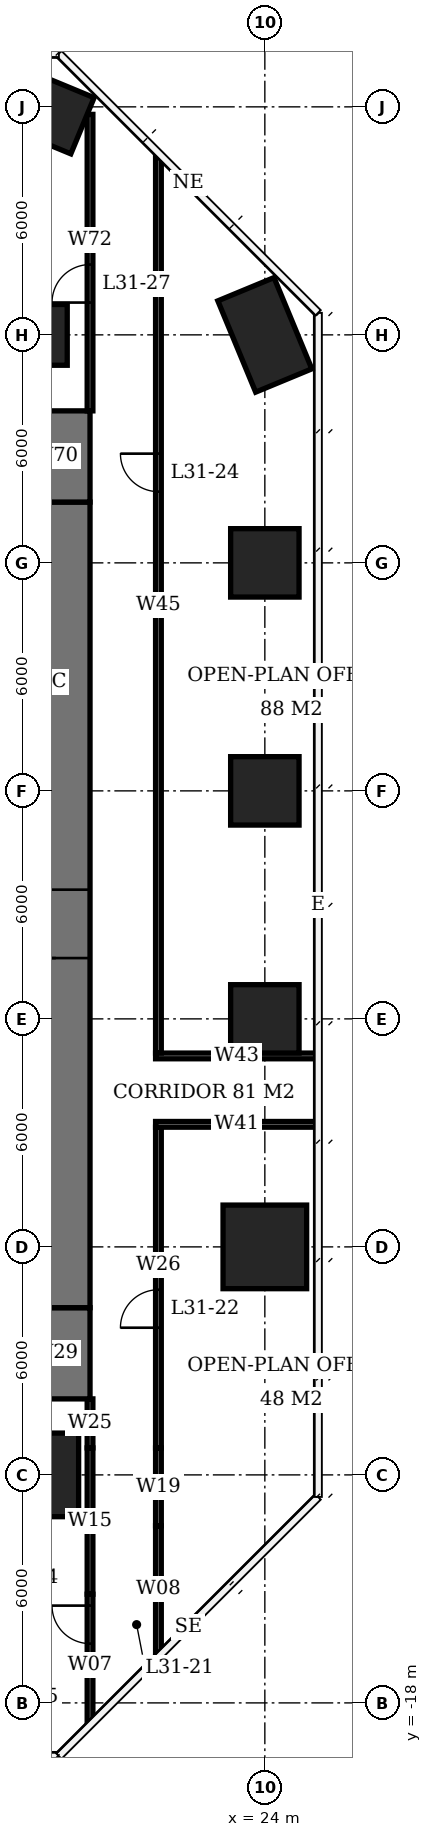
"""IFC4 building model, lengths in metres.
Left out: names, types, materials, properties, quantities, classifications, styles, units other than length and angle.
Written with IfcOpenShell. Run it as: python <this file> out.ifc"""

import sys

from ifc_helpers import new_model, si_unit, direction, frame, frame_2d, origin, origin_2d, place, context, subcontext, project, spatial, rectangle, extrude, element, fill, save


model = new_model("IFC4")
c1 = context("Model", 3, precision=1e-05, world=origin(), true_north=direction((0.0, 1.0)))
c2 = subcontext(c1, "Body", "Model", "MODEL_VIEW")
j1 = project(units=[si_unit("LENGTHUNIT", "METRE"), si_unit("PLANEANGLEUNIT", "RADIAN")], contexts=[c1])
p1 = place(None, origin())
s1 = spatial("IfcSite", under=j1, at=p1, CompositionType="ELEMENT")
p2 = place(p1, origin())
s2 = spatial("IfcBuilding", under=s1, at=p2, CompositionType="ELEMENT")
p3 = place(p2, frame((0.0, 0.0, 128.9)))
s3 = spatial("IfcBuildingStorey", under=s2, at=p3, CompositionType="ELEMENT", Elevation=128.9)
p4 = place(p3, frame((18.0, -12.0, 0.0), z_axis=(0.0, 0.0, 1.0), x_axis=(1.0, 0.0, 0.0)))
e1 = element("IfcColumn", 1, at=p4, inside=s3, PredefinedType="COLUMN", context=c2, shape_type="SweptSolid", body=[
    extrude(rectangle(XDim=2.2, YDim=2.2, at=origin_2d()), origin(), (0.0, 0.0, 1.0), 3.9),
])
p5 = place(p3, frame((18.0, 18.0, 0.0), z_axis=(0.0, 0.0, 1.0), x_axis=(1.0, 0.0, 0.0)))
e2 = element("IfcColumn", 2, at=p5, inside=s3, PredefinedType="COLUMN", context=c2, shape_type="SweptSolid", body=[
    extrude(rectangle(XDim=1.6, YDim=1.6, at=origin_2d()), origin(), (0.0, 0.0, 1.0), 3.9),
])
p6 = place(p3, frame((18.0, 24.0, 0.0), z_axis=(0.0, 0.0, 1.0), x_axis=(0.923879532511, -0.382683432365, 0.0)))
e3 = element("IfcColumn", 3, at=p6, inside=s3, PredefinedType="COLUMN", context=c2, shape_type="SweptSolid", body=[
    extrude(rectangle(XDim=2.6, YDim=1.6, at=origin_2d()), origin(), (0.0, 0.0, 1.0), 3.9),
])
p7 = place(p3, frame((24.0, -6.0, 0.0), z_axis=(0.0, 0.0, 1.0), x_axis=(1.0, 0.0, 0.0)))
e4 = element("IfcColumn", 4, at=p7, inside=s3, PredefinedType="COLUMN", context=c2, shape_type="SweptSolid", body=[
    extrude(rectangle(XDim=2.2, YDim=2.2, at=origin_2d()), origin(), (0.0, 0.0, 1.0), 3.9),
])
for number, where, z_axis, x_axis in (
    (5, (24.0, 0.0, 0.0), (0.0, 0.0, 1.0), (1.0, 0.0, 0.0)),
    (6, (24.0, 6.0, 0.0), (0.0, 0.0, 1.0), (1.0, 0.0, 0.0)),
    (7, (24.0, 12.0, 0.0), (0.0, 0.0, 1.0), (1.0, 0.0, 0.0)),
):
    element("IfcColumn", number, at=place(p3, frame(where, z_axis=z_axis, x_axis=x_axis)), inside=s3, PredefinedType="COLUMN", context=c2, shape_type="SweptSolid", body=[
        extrude(rectangle(XDim=1.8, YDim=1.8, at=origin_2d()), origin(), (0.0, 0.0, 1.0), 3.9),
    ])
p8 = place(p3, frame((24.0, 18.0, 0.0), z_axis=(0.0, 0.0, 1.0), x_axis=(0.382683432365, -0.923879532511, 0.0)))
e8 = element("IfcColumn", 8, at=p8, inside=s3, PredefinedType="COLUMN", context=c2, shape_type="SweptSolid", body=[
    extrude(rectangle(XDim=2.6, YDim=1.6, at=origin_2d()), origin(), (0.0, 0.0, 1.0), 3.9),
])
p9 = place(p3, frame((18.5, -7.6, 0.0), z_axis=(0.0, 0.0, 1.0), x_axis=(0.0, 1.0, 0.0)))
e9 = element("IfcWall", 9, at=p9, inside=s3, PredefinedType="SHEAR", context=c2, shape_type="SweptSolid", body=[
    extrude(rectangle(XDim=21.2, YDim=1.8, at=frame_2d((10.6, 0.0))), origin(), (0.0, 0.0, 1.0), 3.9),
])
p10 = place(p9, frame((9.2, 0.0, 0.0)))
e10 = element("IfcOpeningElement", 10, at=p10, cuts=e9, PredefinedType="OPENING", context=c2, shape_type="SweptSolid", body=[
    extrude(rectangle(XDim=1.8, YDim=2.4, at=frame_2d((0.9, 1.2))), frame((0.0, 0.91, 0.0), z_axis=(0.0, -1.0, 0.0), x_axis=(1.0, 0.0, 0.0)), (0.0, 0.0, 1.0), 1.82),
])
for number, where, z_axis, x_axis in (
    (11, (18.5, -10.0, 0.0), (0.0, 0.0, 1.0), (0.0, 1.0, 0.0)),
    (12, (18.5, 13.6, 0.0), (0.0, 0.0, 1.0), (0.0, 1.0, 0.0)),
):
    element("IfcWall", number, at=place(p3, frame(where, z_axis=z_axis, x_axis=x_axis)), inside=s3, PredefinedType="SHEAR", context=c2, shape_type="SweptSolid", body=[
        extrude(rectangle(XDim=2.4, YDim=1.8, at=frame_2d((1.2, 0.0))), origin(), (0.0, 0.0, 1.0), 3.9),
    ])
p11 = place(p3, frame((19.4, -18.489, 0.0), z_axis=(0.0, 0.0, 1.0), x_axis=(0.0, 1.0, 0.0)))
e13 = element("IfcWall", 13, at=p11, inside=s3, PredefinedType="PARTITIONING", context=c2, shape_type="SweptSolid", body=[
    extrude(rectangle(XDim=3.349, YDim=0.15, at=frame_2d((1.675, 0.0))), origin(), (0.0, 0.0, 1.0), 3.65),
])
p12 = place(p11, frame((2.049, 0.0, 0.0)))
e14 = element("IfcOpeningElement", 14, at=p12, cuts=e13, PredefinedType="OPENING", context=c2, shape_type="SweptSolid", body=[
    extrude(rectangle(XDim=1.0, YDim=2.1, at=frame_2d((0.5, 1.05))), frame((0.0, 0.085, 0.0), z_axis=(0.0, -1.0, 0.0), x_axis=(1.0, 0.0, 0.0)), (0.0, 0.0, 1.0), 0.17),
])
p13 = place(p3, frame((19.4, -15.14, 0.0), z_axis=(0.0, 0.0, 1.0), x_axis=(0.0, 1.0, 0.0)))
e15 = element("IfcWall", 15, at=p13, inside=s3, PredefinedType="PARTITIONING", context=c2, shape_type="SweptSolid", body=[
    extrude(rectangle(XDim=3.85, YDim=0.15, at=frame_2d((1.925, 0.0))), origin(), (0.0, 0.0, 1.0), 2.65),
])
p14 = place(p3, frame((19.4, -11.29, 0.0), z_axis=(0.0, 0.0, 1.0), x_axis=(0.0, 1.0, 0.0)))
e16 = element("IfcWall", 16, at=p14, inside=s3, PredefinedType="PARTITIONING", context=c2, shape_type="SweptSolid", body=[
    extrude(rectangle(XDim=1.29, YDim=0.15, at=frame_2d((0.645, 0.0))), origin(), (0.0, 0.0, 1.0), 3.65),
])
p15 = place(p3, frame((19.4, 16.0, 0.0), z_axis=(0.0, 0.0, 1.0), x_axis=(0.0, 1.0, 0.0)))
e17 = element("IfcWall", 17, at=p15, inside=s3, PredefinedType="PARTITIONING", context=c2, shape_type="SweptSolid", body=[
    extrude(rectangle(XDim=7.802, YDim=0.15, at=frame_2d((3.901, 0.0))), origin(), (0.0, 0.0, 1.0), 3.65),
])
p16 = place(p15, frame((2.85, 0.0, 0.0)))
e18 = element("IfcOpeningElement", 18, at=p16, cuts=e17, PredefinedType="OPENING", context=c2, shape_type="SweptSolid", body=[
    extrude(rectangle(XDim=1.0, YDim=2.1, at=frame_2d((0.5, 1.05))), frame((0.0, 0.085, 0.0), z_axis=(0.0, -1.0, 0.0), x_axis=(1.0, 0.0, 0.0)), (0.0, 0.0, 1.0), 0.17),
])
p17 = place(p3, frame((21.2, -16.689, 0.0), z_axis=(0.0, 0.0, 1.0), x_axis=(0.0, 1.0, 0.0)))
e19 = element("IfcWall", 19, at=p17, inside=s3, PredefinedType="PARTITIONING", context=c2, shape_type="SweptSolid", body=[
    extrude(rectangle(XDim=3.349, YDim=0.15, at=frame_2d((1.674, 0.0))), origin(), (0.0, 0.0, 1.0), 3.65),
])
p18 = place(p3, frame((21.2, -13.34, 0.0), z_axis=(0.0, 0.0, 1.0), x_axis=(0.0, 1.0, 0.0)))
e20 = element("IfcWall", 20, at=p18, inside=s3, PredefinedType="PARTITIONING", context=c2, shape_type="SweptSolid", body=[
    extrude(rectangle(XDim=2.05, YDim=0.15, at=frame_2d((1.025, 0.0))), origin(), (0.0, 0.0, 1.0), 2.65),
])
p19 = place(p3, frame((21.2, -11.29, 0.0), z_axis=(0.0, 0.0, 1.0), x_axis=(0.0, 1.0, 0.0)))
e21 = element("IfcWall", 21, at=p19, inside=s3, PredefinedType="PARTITIONING", context=c2, shape_type="SweptSolid", body=[
    extrude(rectangle(XDim=8.44, YDim=0.15, at=frame_2d((4.22, 0.0))), origin(), (0.0, 0.0, 1.0), 3.65),
])
p20 = place(p19, frame((3.163, 0.0, 0.0)))
e22 = element("IfcOpeningElement", 22, at=p20, cuts=e21, PredefinedType="OPENING", context=c2, shape_type="SweptSolid", body=[
    extrude(rectangle(XDim=1.0, YDim=2.1, at=frame_2d((0.5, 1.05))), frame((0.0, 0.085, 0.0), z_axis=(0.0, -1.0, 0.0), x_axis=(1.0, 0.0, 0.0)), (0.0, 0.0, 1.0), 0.17),
])
p21 = place(p3, frame((21.125, -2.775, 0.0), z_axis=(0.0, 0.0, 1.0), x_axis=(1.0, 0.0, 0.0)))
e23 = element("IfcWall", 23, at=p21, inside=s3, PredefinedType="PARTITIONING", context=c2, shape_type="SweptSolid", body=[
    extrude(rectangle(XDim=4.275, YDim=0.15, at=frame_2d((2.137, 0.0))), origin(), (0.0, 0.0, 1.0), 3.65),
])
p22 = place(p3, frame((21.2, -0.9, 0.0), z_axis=(0.0, 0.0, 1.0), x_axis=(0.0, 1.0, 0.0)))
e24 = element("IfcWall", 24, at=p22, inside=s3, PredefinedType="PARTITIONING", context=c2, shape_type="SweptSolid", body=[
    extrude(rectangle(XDim=23.589, YDim=0.15, at=frame_2d((11.794, 0.0))), origin(), (0.0, 0.0, 1.0), 3.65),
])
p23 = place(p22, frame((14.774, 0.0, 0.0)))
e25 = element("IfcOpeningElement", 25, at=p23, cuts=e24, PredefinedType="OPENING", context=c2, shape_type="SweptSolid", body=[
    extrude(rectangle(XDim=1.0, YDim=2.1, at=frame_2d((0.5, 1.05))), frame((0.0, 0.085, 0.0), z_axis=(0.0, -1.0, 0.0), x_axis=(1.0, 0.0, 0.0)), (0.0, 0.0, 1.0), 0.17),
])
p24 = place(p3, frame((21.125, -0.975, 0.0), z_axis=(0.0, 0.0, 1.0), x_axis=(1.0, 0.0, 0.0)))
e26 = element("IfcWall", 26, at=p24, inside=s3, PredefinedType="PARTITIONING", context=c2, shape_type="SweptSolid", body=[
    extrude(rectangle(XDim=4.275, YDim=0.15, at=frame_2d((2.137, 0.0))), origin(), (0.0, 0.0, 1.0), 3.65),
])
p25 = place(p10, origin())
e27 = element("IfcDoor", 27, at=p25, inside=s3, OperationType="DOUBLE_DOOR_SINGLE_SWING", PredefinedType="DOOR", context=c2, shape_type="SweptSolid", body=[
    extrude(rectangle(XDim=1.8, YDim=2.4, at=frame_2d((0.9, 1.2))), frame((0.0, 0.025, 0.0), z_axis=(0.0, -1.0, 0.0), x_axis=(1.0, 0.0, 0.0)), (0.0, 0.0, 1.0), 0.05),
])
fill(e10, e27)
p26 = place(p12, origin())
e28 = element("IfcDoor", 28, at=p26, inside=s3, OperationType="SINGLE_SWING_RIGHT", PredefinedType="DOOR", context=c2, shape_type="SweptSolid", body=[
    extrude(rectangle(XDim=1.0, YDim=2.1, at=frame_2d((0.5, 1.05))), frame((0.0, 0.025, 0.0), z_axis=(0.0, -1.0, 0.0), x_axis=(1.0, 0.0, 0.0)), (0.0, 0.0, 1.0), 0.05),
])
fill(e14, e28)
p27 = place(p20, origin())
e29 = element("IfcDoor", 29, at=p27, inside=s3, OperationType="SINGLE_SWING_LEFT", PredefinedType="DOOR", context=c2, shape_type="SweptSolid", body=[
    extrude(rectangle(XDim=1.0, YDim=2.1, at=frame_2d((0.5, 1.05))), frame((0.0, 0.025, 0.0), z_axis=(0.0, -1.0, 0.0), x_axis=(1.0, 0.0, 0.0)), (0.0, 0.0, 1.0), 0.05),
])
fill(e22, e29)
p28 = place(p23, origin())
e30 = element("IfcDoor", 30, at=p28, inside=s3, OperationType="SINGLE_SWING_RIGHT", PredefinedType="DOOR", context=c2, shape_type="SweptSolid", body=[
    extrude(rectangle(XDim=1.0, YDim=2.1, at=frame_2d((0.5, 1.05))), frame((0.0, 0.025, 0.0), z_axis=(0.0, -1.0, 0.0), x_axis=(1.0, 0.0, 0.0)), (0.0, 0.0, 1.0), 0.05),
])
fill(e25, e30)
p29 = place(p16, origin())
e31 = element("IfcDoor", 31, at=p29, inside=s3, OperationType="SINGLE_SWING_LEFT", PredefinedType="DOOR", context=c2, shape_type="SweptSolid", body=[
    extrude(rectangle(XDim=1.0, YDim=2.1, at=frame_2d((0.5, 1.05))), frame((0.0, 0.025, 0.0), z_axis=(0.0, -1.0, 0.0), x_axis=(1.0, 0.0, 0.0)), (0.0, 0.0, 1.0), 0.05),
])
fill(e18, e31)
save(model, sys.argv[1])
